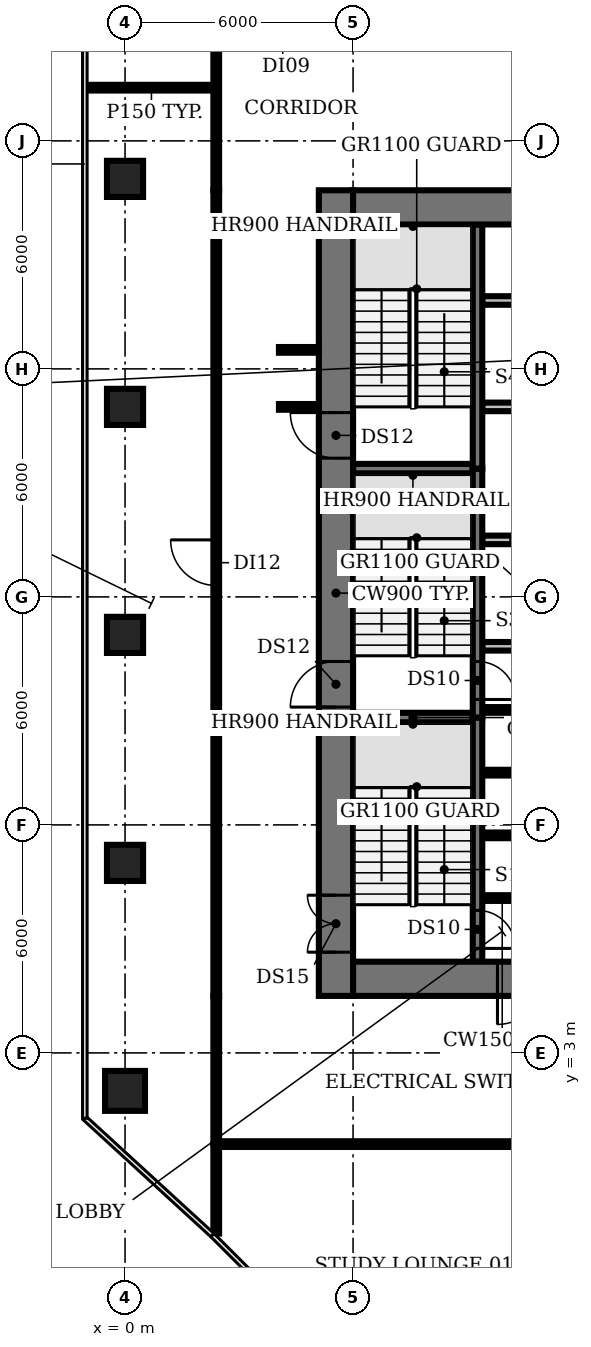
"""IFC4 building model, lengths in metres.
Left out: names, types, materials, properties, quantities, classifications, styles, units other than length and angle.
Written with IfcOpenShell. Run it as: python <this file> out.ifc"""

import sys

from ifc_helpers import new_model, si_unit, direction, frame, frame_2d, origin, origin_2d, place, context, subcontext, project, spatial, rectangle, circle, extrude, element, fill, save


model = new_model("IFC4")
c1 = context("Model", 3, precision=1e-05, world=origin(), true_north=direction((0.0, 1.0)))
c2 = subcontext(c1, "Body", "Model", "MODEL_VIEW")
j1 = project(units=[si_unit("LENGTHUNIT", "METRE"), si_unit("PLANEANGLEUNIT", "RADIAN")], contexts=[c1])
p1 = place(None, origin())
s1 = spatial("IfcSite", under=j1, at=p1, CompositionType="ELEMENT")
p2 = place(p1, origin())
s2 = spatial("IfcBuilding", under=s1, at=p2, CompositionType="ELEMENT")
p3 = place(p2, frame((0.0, 0.0, 62.6)))
s3 = spatial("IfcBuildingStorey", under=s2, at=p3, CompositionType="ELEMENT", Elevation=62.6)
p4 = place(p3, frame((0.0, 2.0, 0.0), z_axis=(0.0, 0.0, 1.0), x_axis=(1.0, 0.0, 0.0)))
e1 = element("IfcColumn", 1, at=p4, inside=s3, PredefinedType="COLUMN", context=c2, shape_type="SweptSolid", body=[
    extrude(circle(Radius=0.525, at=origin_2d()), origin(), (0.0, 0.0, 1.0), 3.85),
])
for number, where, z_axis, x_axis in (
    (2, (0.0, 8.0, 0.0), (0.0, 0.0, 1.0), (1.0, 0.0, 0.0)),
    (3, (0.0, 14.0, 0.0), (0.0, 0.0, 1.0), (1.0, 0.0, 0.0)),
    (4, (0.0, 20.0, 0.0), (0.0, 0.0, 1.0), (1.0, 0.0, 0.0)),
    (5, (0.0, 26.0, 0.0), (0.0, 0.0, 1.0), (1.0, 0.0, 0.0)),
):
    element("IfcColumn", number, at=place(p3, frame(where, z_axis=z_axis, x_axis=x_axis)), inside=s3, PredefinedType="COLUMN", context=c2, shape_type="SweptSolid", body=[
        extrude(rectangle(XDim=0.95, YDim=0.95, at=origin_2d()), origin(), (0.0, 0.0, 1.0), 3.85),
    ])
for number, where, z_axis, x_axis in (
    (6, (9.4, 7.075, 0.0), (0.0, 0.0, 1.0), (1.0, 0.0, 0.0)),
    (7, (9.4, 8.725, 0.0), (0.0, 0.0, 1.0), (1.0, 0.0, 0.0)),
    (8, (9.4, 10.375, 0.0), (0.0, 0.0, 1.0), (1.0, 0.0, 0.0)),
):
    element("IfcWall", number, at=place(p3, frame(where, z_axis=z_axis, x_axis=x_axis)), inside=s3, PredefinedType="SHEAR", context=c2, shape_type="SweptSolid", body=[
        extrude(rectangle(XDim=1.05, YDim=0.15, at=frame_2d((0.525, 0.0))), origin(), (0.0, 0.0, 1.0), 3.85),
    ])
p5 = place(p3, frame((6.0, 11.825, 0.0), z_axis=(0.0, 0.0, 1.0), x_axis=(1.0, 0.0, 0.0)))
e9 = element("IfcWall", 9, at=p5, inside=s3, PredefinedType="SHEAR", context=c2, shape_type="SweptSolid", body=[
    extrude(rectangle(XDim=3.15, YDim=0.25, at=frame_2d((1.575, 0.0))), origin(), (0.0, 0.0, 1.0), 3.85),
])
p6 = place(p3, frame((9.4, 12.025, 0.0), z_axis=(0.0, 0.0, 1.0), x_axis=(1.0, 0.0, 0.0)))
e10 = element("IfcWall", 10, at=p6, inside=s3, PredefinedType="SHEAR", context=c2, shape_type="SweptSolid", body=[
    extrude(rectangle(XDim=1.05, YDim=0.15, at=frame_2d((0.525, 0.0))), origin(), (0.0, 0.0, 1.0), 3.85),
])
p7 = place(p3, frame((9.4, 13.7, 0.0), z_axis=(0.0, 0.0, 1.0), x_axis=(1.0, 0.0, 0.0)))
e11 = element("IfcWall", 11, at=p7, inside=s3, PredefinedType="PARTITIONING", context=c2, shape_type="SweptSolid", body=[
    extrude(rectangle(XDim=4.0, YDim=0.225, at=frame_2d((2.0, 0.0))), origin(), (0.0, 0.0, 1.0), 3.85),
])
p8 = place(p3, frame((9.4, 16.5, 0.0), z_axis=(0.0, 0.0, 1.0), x_axis=(1.0, 0.0, 0.0)))
e12 = element("IfcWall", 12, at=p8, inside=s3, PredefinedType="PARTITIONING", context=c2, shape_type="SweptSolid", body=[
    extrude(rectangle(XDim=14.6, YDim=0.225, at=frame_2d((7.3, 0.0))), origin(), (0.0, 0.0, 1.0), 3.85),
])
p9 = place(p8, frame((0.75, 0.0, 0.0)))
e13 = element("IfcOpeningElement", 13, at=p9, cuts=e12, PredefinedType="OPENING", context=c2, shape_type="SweptSolid", body=[
    extrude(rectangle(XDim=1.1, YDim=2.1, at=frame_2d((0.55, 1.05))), frame((0.0, 0.123, 0.0), z_axis=(0.0, -1.0, 0.0), x_axis=(1.0, 0.0, 0.0)), (0.0, 0.0, 1.0), 0.245),
])
p10 = place(p8, frame((3.55, 0.0, 0.0)))
e14 = element("IfcOpeningElement", 14, at=p10, cuts=e12, PredefinedType="OPENING", context=c2, shape_type="SweptSolid", body=[
    extrude(rectangle(XDim=1.1, YDim=2.1, at=frame_2d((0.55, 1.05))), frame((0.0, 0.123, 0.0), z_axis=(0.0, -1.0, 0.0), x_axis=(1.0, 0.0, 0.0)), (0.0, 0.0, 1.0), 0.245),
])
p11 = place(p8, frame((6.35, 0.0, 0.0)))
e15 = element("IfcOpeningElement", 15, at=p11, cuts=e12, PredefinedType="OPENING", context=c2, shape_type="SweptSolid", body=[
    extrude(rectangle(XDim=1.1, YDim=2.1, at=frame_2d((0.55, 1.05))), frame((0.0, 0.123, 0.0), z_axis=(0.0, -1.0, 0.0), x_axis=(1.0, 0.0, 0.0)), (0.0, 0.0, 1.0), 0.245),
])
p12 = place(p8, frame((9.15, 0.0, 0.0)))
e16 = element("IfcOpeningElement", 16, at=p12, cuts=e12, PredefinedType="OPENING", context=c2, shape_type="SweptSolid", body=[
    extrude(rectangle(XDim=1.1, YDim=2.1, at=frame_2d((0.55, 1.05))), frame((0.0, 0.123, 0.0), z_axis=(0.0, -1.0, 0.0), x_axis=(1.0, 0.0, 0.0)), (0.0, 0.0, 1.0), 0.245),
])
p13 = place(p8, frame((11.647, 0.0, 0.0)))
e17 = element("IfcOpeningElement", 17, at=p13, cuts=e12, PredefinedType="OPENING", context=c2, shape_type="SweptSolid", body=[
    extrude(rectangle(XDim=0.9, YDim=2.1, at=frame_2d((0.45, 1.05))), frame((0.0, 0.123, 0.0), z_axis=(0.0, -1.0, 0.0), x_axis=(1.0, 0.0, 0.0)), (0.0, 0.0, 1.0), 0.245),
])
p14 = place(p8, frame((13.423, 0.0, 0.0)))
e18 = element("IfcOpeningElement", 18, at=p14, cuts=e12, PredefinedType="OPENING", context=c2, shape_type="SweptSolid", body=[
    extrude(rectangle(XDim=0.9, YDim=2.1, at=frame_2d((0.45, 1.05))), frame((0.0, 0.123, 0.0), z_axis=(0.0, -1.0, 0.0), x_axis=(1.0, 0.0, 0.0)), (0.0, 0.0, 1.0), 0.245),
])
p15 = place(p3, frame((6.0, 18.375, 0.0), z_axis=(0.0, 0.0, 1.0), x_axis=(1.0, 0.0, 0.0)))
e19 = element("IfcWall", 19, at=p15, inside=s3, PredefinedType="SHEAR", context=c2, shape_type="SweptSolid", body=[
    extrude(rectangle(XDim=3.15, YDim=0.25, at=frame_2d((1.575, 0.0))), origin(), (0.0, 0.0, 1.0), 3.85),
])
p16 = place(p3, frame((24.0, 20.0, 0.0), z_axis=(0.0, 0.0, 1.0), x_axis=(-1.0, 0.0, 0.0)))
e20 = element("IfcWall", 20, at=p16, inside=s3, PredefinedType="PARTITIONING", context=c2, shape_type="SweptSolid", body=[
    extrude(rectangle(XDim=14.6, YDim=0.225, at=frame_2d((7.3, 0.0))), origin(), (0.0, 0.0, 1.0), 3.85),
])
p17 = place(p16, frame((12.9, 0.0, 0.0)))
e21 = element("IfcOpeningElement", 21, at=p17, cuts=e20, PredefinedType="OPENING", context=c2, shape_type="SweptSolid", body=[
    extrude(rectangle(XDim=0.9, YDim=2.1, at=frame_2d((0.45, 1.05))), frame((0.0, 0.123, 0.0), z_axis=(0.0, -1.0, 0.0), x_axis=(1.0, 0.0, 0.0)), (0.0, 0.0, 1.0), 0.245),
])
p18 = place(p16, frame((9.475, 0.0, 0.0)))
e22 = element("IfcOpeningElement", 22, at=p18, cuts=e20, PredefinedType="OPENING", context=c2, shape_type="SweptSolid", body=[
    extrude(rectangle(XDim=1.0, YDim=2.1, at=frame_2d((0.5, 1.05))), frame((0.0, 0.123, 0.0), z_axis=(0.0, -1.0, 0.0), x_axis=(1.0, 0.0, 0.0)), (0.0, 0.0, 1.0), 0.245),
])
p19 = place(p16, frame((6.375, 0.0, 0.0)))
e23 = element("IfcOpeningElement", 23, at=p19, cuts=e20, PredefinedType="OPENING", context=c2, shape_type="SweptSolid", body=[
    extrude(rectangle(XDim=0.9, YDim=2.1, at=frame_2d((0.45, 1.05))), frame((0.0, 0.123, 0.0), z_axis=(0.0, -1.0, 0.0), x_axis=(1.0, 0.0, 0.0)), (0.0, 0.0, 1.0), 0.245),
])
p20 = place(p16, frame((4.175, 0.0, 0.0)))
e24 = element("IfcOpeningElement", 24, at=p20, cuts=e20, PredefinedType="OPENING", context=c2, shape_type="SweptSolid", body=[
    extrude(rectangle(XDim=0.9, YDim=2.1, at=frame_2d((0.45, 1.05))), frame((0.0, 0.123, 0.0), z_axis=(0.0, -1.0, 0.0), x_axis=(1.0, 0.0, 0.0)), (0.0, 0.0, 1.0), 0.245),
])
p21 = place(p16, frame((2.137, 0.0, 0.0)))
e25 = element("IfcOpeningElement", 25, at=p21, cuts=e20, PredefinedType="OPENING", context=c2, shape_type="SweptSolid", body=[
    extrude(rectangle(XDim=0.9, YDim=2.1, at=frame_2d((0.45, 1.05))), frame((0.0, 0.123, 0.0), z_axis=(0.0, -1.0, 0.0), x_axis=(1.0, 0.0, 0.0)), (0.0, 0.0, 1.0), 0.245),
])
p22 = place(p16, frame((0.363, 0.0, 0.0)))
e26 = element("IfcOpeningElement", 26, at=p22, cuts=e20, PredefinedType="OPENING", context=c2, shape_type="SweptSolid", body=[
    extrude(rectangle(XDim=0.9, YDim=2.1, at=frame_2d((0.45, 1.05))), frame((0.0, 0.123, 0.0), z_axis=(0.0, -1.0, 0.0), x_axis=(1.0, 0.0, 0.0)), (0.0, 0.0, 1.0), 0.245),
])
p23 = place(p3, frame((9.4, 22.8, 0.0), z_axis=(0.0, 0.0, 1.0), x_axis=(1.0, 0.0, 0.0)))
e27 = element("IfcWall", 27, at=p23, inside=s3, PredefinedType="PARTITIONING", context=c2, shape_type="SweptSolid", body=[
    extrude(rectangle(XDim=14.6, YDim=0.225, at=frame_2d((7.3, 0.0))), origin(), (0.0, 0.0, 1.0), 3.85),
])
p24 = place(p3, frame((9.275, 11.825, 0.0), z_axis=(0.0, 0.0, 1.0), x_axis=(0.0, -1.0, 0.0)))
e28 = element("IfcWall", 28, at=p24, inside=s3, PredefinedType="SHEAR", context=c2, shape_type="SweptSolid", body=[
    extrude(rectangle(XDim=6.425, YDim=0.25, at=frame_2d((3.212, 0.0))), origin(), (0.0, 0.0, 1.0), 3.85),
])
p25 = place(p24, frame((5.075, 0.0, 0.0)))
e29 = element("IfcOpeningElement", 29, at=p25, cuts=e28, PredefinedType="OPENING", context=c2, shape_type="SweptSolid", body=[
    extrude(rectangle(XDim=1.0, YDim=2.1, at=frame_2d((0.5, 1.05))), frame((0.0, 0.135, 0.0), z_axis=(0.0, -1.0, 0.0), x_axis=(1.0, 0.0, 0.0)), (0.0, 0.0, 1.0), 0.27),
])
p26 = place(p3, frame((9.275, 18.375, 0.0), z_axis=(0.0, 0.0, 1.0), x_axis=(0.0, -1.0, 0.0)))
e30 = element("IfcWall", 30, at=p26, inside=s3, PredefinedType="SHEAR", context=c2, shape_type="SweptSolid", body=[
    extrude(rectangle(XDim=6.55, YDim=0.25, at=frame_2d((3.275, 0.0))), origin(), (0.0, 0.0, 1.0), 3.85),
])
p27 = place(p26, frame((5.075, 0.0, 0.0)))
e31 = element("IfcOpeningElement", 31, at=p27, cuts=e30, PredefinedType="OPENING", context=c2, shape_type="SweptSolid", body=[
    extrude(rectangle(XDim=1.0, YDim=2.1, at=frame_2d((0.5, 1.05))), frame((0.0, 0.135, 0.0), z_axis=(0.0, -1.0, 0.0), x_axis=(1.0, 0.0, 0.0)), (0.0, 0.0, 1.0), 0.27),
])
p28 = place(p3, frame((9.275, 18.375, 0.0), z_axis=(0.0, 0.0, 1.0), x_axis=(0.0, 1.0, 0.0)))
e32 = element("IfcWall", 32, at=p28, inside=s3, PredefinedType="SHEAR", context=c2, shape_type="SweptSolid", body=[
    extrude(rectangle(XDim=6.425, YDim=0.25, at=frame_2d((3.212, 0.0))), origin(), (0.0, 0.0, 1.0), 3.85),
])
p29 = place(p3, frame((5.55, 4.5, 0.0), z_axis=(0.0, 0.0, 1.0), x_axis=(0.0, 1.0, 0.0)))
e33 = element("IfcWall", 33, at=p29, inside=s3, PredefinedType="SHEAR", context=c2, shape_type="SweptSolid", body=[
    extrude(rectangle(XDim=21.2, YDim=0.9, at=frame_2d((10.6, 0.0))), origin(), (0.0, 0.0, 1.0), 3.85),
])
p30 = place(p29, frame((1.15, 0.0, 0.0)))
e34 = element("IfcOpeningElement", 34, at=p30, cuts=e33, PredefinedType="OPENING", context=c2, shape_type="SweptSolid", body=[
    extrude(rectangle(XDim=1.5, YDim=2.1, at=frame_2d((0.75, 1.05))), frame((0.0, 0.46, 0.0), z_axis=(0.0, -1.0, 0.0), x_axis=(1.0, 0.0, 0.0)), (0.0, 0.0, 1.0), 0.92),
])
p31 = place(p29, frame((7.6, 0.0, 0.0)))
e35 = element("IfcOpeningElement", 35, at=p31, cuts=e33, PredefinedType="OPENING", context=c2, shape_type="SweptSolid", body=[
    extrude(rectangle(XDim=1.2, YDim=2.1, at=frame_2d((0.6, 1.05))), frame((0.0, 0.46, 0.0), z_axis=(0.0, -1.0, 0.0), x_axis=(1.0, 0.0, 0.0)), (0.0, 0.0, 1.0), 0.92),
])
p32 = place(p29, frame((14.15, 0.0, 0.0)))
e36 = element("IfcOpeningElement", 36, at=p32, cuts=e33, PredefinedType="OPENING", context=c2, shape_type="SweptSolid", body=[
    extrude(rectangle(XDim=1.2, YDim=2.1, at=frame_2d((0.6, 1.05))), frame((0.0, 0.46, 0.0), z_axis=(0.0, -1.0, 0.0), x_axis=(1.0, 0.0, 0.0)), (0.0, 0.0, 1.0), 0.92),
])
p33 = place(p3, frame((24.0, 4.95, 0.0), z_axis=(0.0, 0.0, 1.0), x_axis=(-1.0, 0.0, 0.0)))
e37 = element("IfcWall", 37, at=p33, inside=s3, PredefinedType="SHEAR", context=c2, shape_type="SweptSolid", body=[
    extrude(rectangle(XDim=18.0, YDim=0.9, at=frame_2d((9.0, 0.0))), origin(), (0.0, 0.0, 1.0), 3.85),
])
p34 = place(p33, frame((13.0, 0.0, 0.0)))
e38 = element("IfcOpeningElement", 38, at=p34, cuts=e37, PredefinedType="OPENING", context=c2, shape_type="SweptSolid", body=[
    extrude(rectangle(XDim=1.2, YDim=2.1, at=frame_2d((0.6, 1.05))), frame((0.0, 0.46, 0.0), z_axis=(0.0, -1.0, 0.0), x_axis=(1.0, 0.0, 0.0)), (0.0, 0.0, 1.0), 0.92),
])
p35 = place(p33, frame((4.9, 0.0, 0.0)))
e39 = element("IfcOpeningElement", 39, at=p35, cuts=e37, PredefinedType="OPENING", context=c2, shape_type="SweptSolid", body=[
    extrude(rectangle(XDim=1.0, YDim=2.1, at=frame_2d((0.5, 1.05))), frame((0.0, 0.46, 0.0), z_axis=(0.0, -1.0, 0.0), x_axis=(1.0, 0.0, 0.0)), (0.0, 0.0, 1.0), 0.92),
])
p36 = place(p3, frame((6.0, 25.25, 0.0), z_axis=(0.0, 0.0, 1.0), x_axis=(1.0, 0.0, 0.0)))
e40 = element("IfcWall", 40, at=p36, inside=s3, PredefinedType="SHEAR", context=c2, shape_type="SweptSolid", body=[
    extrude(rectangle(XDim=18.0, YDim=0.9, at=frame_2d((9.0, 0.0))), origin(), (0.0, 0.0, 1.0), 3.85),
])
p37 = place(p3, frame((-1.01, 28.4, 0.0), z_axis=(0.0, 0.0, 1.0), x_axis=(1.0, 0.0, 0.0)))
e41 = element("IfcWall", 41, at=p37, inside=s3, PredefinedType="PARTITIONING", context=c2, shape_type="SweptSolid", body=[
    extrude(rectangle(XDim=3.41, YDim=0.15, at=frame_2d((1.705, 0.0))), origin(), (0.0, 0.0, 1.0), 2.83),
])
p38 = place(p3, frame((2.4, -1.753, 0.0), z_axis=(0.0, 0.0, 1.0), x_axis=(0.0, 1.0, 0.0)))
e42 = element("IfcWall", 42, at=p38, inside=s3, PredefinedType="PARTITIONING", context=c2, shape_type="SweptSolid", body=[
    extrude(rectangle(XDim=2.353, YDim=0.15, at=frame_2d((1.177, 0.0))), origin(), (0.0, 0.0, 1.0), 2.83),
])
p39 = place(p3, frame((2.4, 0.6, 0.0), z_axis=(0.0, 0.0, 1.0), x_axis=(0.0, 1.0, 0.0)))
e43 = element("IfcWall", 43, at=p39, inside=s3, PredefinedType="PARTITIONING", context=c2, shape_type="SweptSolid", body=[
    extrude(rectangle(XDim=3.9, YDim=0.15, at=frame_2d((1.95, 0.0))), origin(), (0.0, 0.0, 1.0), 2.83),
])
p40 = place(p3, frame((2.4, 4.5, 0.0), z_axis=(0.0, 0.0, 1.0), x_axis=(0.0, 1.0, 0.0)))
e44 = element("IfcWall", 44, at=p40, inside=s3, PredefinedType="PARTITIONING", context=c2, shape_type="SweptSolid", body=[
    extrude(rectangle(XDim=21.2, YDim=0.15, at=frame_2d((10.6, 0.0))), origin(), (0.0, 0.0, 1.0), 2.83),
])
p41 = place(p40, frame((10.8, 0.0, 0.0)))
e45 = element("IfcOpeningElement", 45, at=p41, cuts=e44, PredefinedType="OPENING", context=c2, shape_type="SweptSolid", body=[
    extrude(rectangle(XDim=1.2, YDim=2.1, at=frame_2d((0.6, 1.05))), frame((0.0, 0.085, 0.0), z_axis=(0.0, -1.0, 0.0), x_axis=(1.0, 0.0, 0.0)), (0.0, 0.0, 1.0), 0.17),
])
p42 = place(p3, frame((2.4, 25.7, 0.0), z_axis=(0.0, 0.0, 1.0), x_axis=(0.0, 1.0, 0.0)))
e46 = element("IfcWall", 46, at=p42, inside=s3, PredefinedType="PARTITIONING", context=c2, shape_type="SweptSolid", body=[
    extrude(rectangle(XDim=3.9, YDim=0.15, at=frame_2d((1.95, 0.0))), origin(), (0.0, 0.0, 1.0), 2.83),
])
for number, where, z_axis, x_axis in (
    (47, (4.05, 20.0, 0.0), (0.0, 0.0, 1.0), (1.0, 0.0, 0.0)),
    (48, (4.05, 21.5, 0.0), (0.0, 0.0, 1.0), (1.0, 0.0, 0.0)),
):
    element("IfcWall", number, at=place(p3, frame(where, z_axis=z_axis, x_axis=x_axis)), inside=s3, PredefinedType="PARTITIONING", context=c2, shape_type="SweptSolid", body=[
        extrude(rectangle(XDim=1.05, YDim=0.15, at=frame_2d((0.525, 0.0))), origin(), (0.0, 0.0, 1.0), 2.83),
    ])
p43 = place(p3, frame((27.6, 0.6, 0.0), z_axis=(0.0, 0.0, 1.0), x_axis=(-1.0, 0.0, 0.0)))
e49 = element("IfcWall", 49, at=p43, inside=s3, PredefinedType="PARTITIONING", context=c2, shape_type="SweptSolid", body=[
    extrude(rectangle(XDim=25.2, YDim=0.15, at=frame_2d((12.6, 0.0))), origin(), (0.0, 0.0, 1.0), 2.83),
])
p44 = place(p43, frame((12.1, 0.0, 0.0)))
e50 = element("IfcOpeningElement", 50, at=p44, cuts=e49, PredefinedType="OPENING", context=c2, shape_type="SweptSolid", body=[
    extrude(rectangle(XDim=1.2, YDim=2.1, at=frame_2d((0.6, 1.05))), frame((0.0, 0.085, 0.0), z_axis=(0.0, -1.0, 0.0), x_axis=(1.0, 0.0, 0.0)), (0.0, 0.0, 1.0), 0.17),
])
p45 = place(p25, origin())
e51 = element("IfcDoor", 51, at=p45, inside=s3, OperationType="SINGLE_SWING_RIGHT", PredefinedType="DOOR", context=c2, shape_type="SweptSolid", body=[
    extrude(rectangle(XDim=1.0, YDim=2.1, at=frame_2d((0.5, 1.05))), frame((0.0, 0.025, 0.0), z_axis=(0.0, -1.0, 0.0), x_axis=(1.0, 0.0, 0.0)), (0.0, 0.0, 1.0), 0.05),
])
fill(e29, e51)
p46 = place(p27, origin())
e52 = element("IfcDoor", 52, at=p46, inside=s3, OperationType="SINGLE_SWING_RIGHT", PredefinedType="DOOR", context=c2, shape_type="SweptSolid", body=[
    extrude(rectangle(XDim=1.0, YDim=2.1, at=frame_2d((0.5, 1.05))), frame((0.0, 0.025, 0.0), z_axis=(0.0, -1.0, 0.0), x_axis=(1.0, 0.0, 0.0)), (0.0, 0.0, 1.0), 0.05),
])
fill(e31, e52)
p47 = place(p30, origin())
e53 = element("IfcDoor", 53, at=p47, inside=s3, OperationType="DOUBLE_DOOR_SINGLE_SWING", PredefinedType="DOOR", context=c2, shape_type="SweptSolid", body=[
    extrude(rectangle(XDim=1.5, YDim=2.1, at=frame_2d((0.75, 1.05))), frame((0.0, 0.025, 0.0), z_axis=(0.0, -1.0, 0.0), x_axis=(1.0, 0.0, 0.0)), (0.0, 0.0, 1.0), 0.05),
])
fill(e34, e53)
p48 = place(p31, origin())
e54 = element("IfcDoor", 54, at=p48, inside=s3, OperationType="SINGLE_SWING_LEFT", PredefinedType="DOOR", context=c2, shape_type="SweptSolid", body=[
    extrude(rectangle(XDim=1.2, YDim=2.1, at=frame_2d((0.6, 1.05))), frame((0.0, 0.025, 0.0), z_axis=(0.0, -1.0, 0.0), x_axis=(1.0, 0.0, 0.0)), (0.0, 0.0, 1.0), 0.05),
])
fill(e35, e54)
p49 = place(p32, origin())
e55 = element("IfcDoor", 55, at=p49, inside=s3, OperationType="SINGLE_SWING_RIGHT", PredefinedType="DOOR", context=c2, shape_type="SweptSolid", body=[
    extrude(rectangle(XDim=1.2, YDim=2.1, at=frame_2d((0.6, 1.05))), frame((0.0, 0.025, 0.0), z_axis=(0.0, -1.0, 0.0), x_axis=(1.0, 0.0, 0.0)), (0.0, 0.0, 1.0), 0.05),
])
fill(e36, e55)
p50 = place(p34, origin())
e56 = element("IfcDoor", 56, at=p50, inside=s3, OperationType="SINGLE_SWING_RIGHT", PredefinedType="DOOR", context=c2, shape_type="SweptSolid", body=[
    extrude(rectangle(XDim=1.2, YDim=2.1, at=frame_2d((0.6, 1.05))), frame((0.0, 0.025, 0.0), z_axis=(0.0, -1.0, 0.0), x_axis=(1.0, 0.0, 0.0)), (0.0, 0.0, 1.0), 0.05),
])
fill(e38, e56)
p51 = place(p41, origin())
e57 = element("IfcDoor", 57, at=p51, inside=s3, OperationType="SINGLE_SWING_RIGHT", PredefinedType="DOOR", context=c2, shape_type="SweptSolid", body=[
    extrude(rectangle(XDim=1.2, YDim=2.1, at=frame_2d((0.6, 1.05))), frame((0.0, 0.025, 0.0), z_axis=(0.0, -1.0, 0.0), x_axis=(1.0, 0.0, 0.0)), (0.0, 0.0, 1.0), 0.05),
])
fill(e45, e57)
save(model, sys.argv[1])
